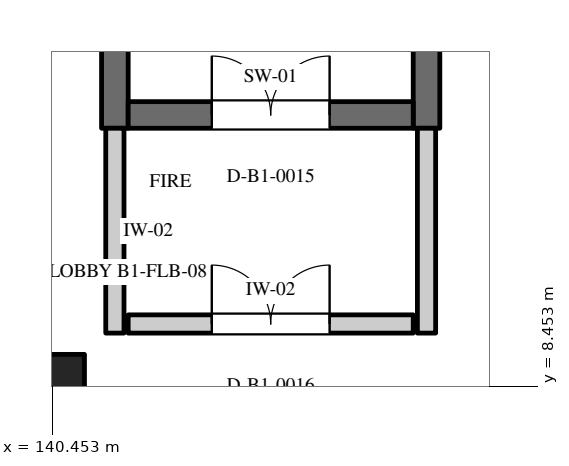
"""IFC4 building model, lengths in metres.
Left out: names, types, materials, properties, quantities, classifications, styles, units other than length and angle.
Written with IfcOpenShell. Run it as: python <this file> out.ifc"""

import sys

from ifc_helpers import new_model, si_unit, direction, frame, frame_2d, origin, origin_2d, place, context, subcontext, project, spatial, rectangle, extrude, element, fill, save


model = new_model("IFC4")
c1 = context("Model", 3, precision=1e-05, world=origin(), true_north=direction((0.0, 1.0)))
c2 = subcontext(c1, "Body", "Model", "MODEL_VIEW")
j1 = project(units=[si_unit("LENGTHUNIT", "METRE"), si_unit("PLANEANGLEUNIT", "RADIAN")], contexts=[c1])
p1 = place(None, origin())
s1 = spatial("IfcSite", under=j1, at=p1, CompositionType="ELEMENT")
p2 = place(p1, origin())
s2 = spatial("IfcBuilding", under=s1, at=p2, CompositionType="ELEMENT")
p3 = place(p2, frame((0.0, 0.0, -4.5)))
s3 = spatial("IfcBuildingStorey", under=s2, at=p3, CompositionType="ELEMENT", Elevation=-4.5)
p4 = place(p3, frame((140.4, 8.4, 0.0), z_axis=(0.0, 0.0, 1.0), x_axis=(1.0, 0.0, 0.0)))
e1 = element("IfcColumn", 1, at=p4, inside=s3, PredefinedType="COLUMN", context=c2, shape_type="SweptSolid", body=[
    extrude(rectangle(XDim=0.95, YDim=0.95, at=origin_2d()), origin(), (0.0, 0.0, 1.0), 4.5),
])
for number, where, z_axis, x_axis in (
    (2, (141.275, 11.85, 0.0), (0.0, 0.0, 1.0), (0.0, 1.0, 0.0)),
    (3, (145.375, 11.85, 0.0), (0.0, 0.0, 1.0), (0.0, 1.0, 0.0)),
):
    element("IfcWall", number, at=place(p3, frame(where, z_axis=z_axis, x_axis=x_axis)), inside=s3, PredefinedType="SHEAR", context=c2, shape_type="SweptSolid", body=[
        extrude(rectangle(XDim=10.5, YDim=0.35, at=frame_2d((5.25, 0.0))), origin(), (0.0, 0.0, 1.0), 4.5),
    ])
p5 = place(p3, frame((141.45, 12.025, 0.0), z_axis=(0.0, 0.0, 1.0), x_axis=(1.0, 0.0, 0.0)))
e4 = element("IfcWall", 4, at=p5, inside=s3, PredefinedType="SHEAR", context=c2, shape_type="SweptSolid", body=[
    extrude(rectangle(XDim=3.75, YDim=0.35, at=frame_2d((1.875, 0.0))), origin(), (0.0, 0.0, 1.0), 4.15),
])
p6 = place(p5, frame((1.1, 0.0, 0.0)))
e5 = element("IfcOpeningElement", 5, at=p6, cuts=e4, PredefinedType="OPENING", context=c2, shape_type="SweptSolid", body=[
    extrude(rectangle(XDim=1.55, YDim=2.25, at=frame_2d((0.775, 1.125))), frame((0.0, 0.187, 0.0), z_axis=(0.0, -1.0, 0.0), x_axis=(1.0, 0.0, 0.0)), (0.0, 0.0, 1.0), 0.374),
])
for number, where, z_axis, x_axis in (
    (6, (141.275, 9.155, 0.0), (0.0, 0.0, 1.0), (0.0, 1.0, 0.0)),
    (7, (145.375, 9.155, 0.0), (0.0, 0.0, 1.0), (0.0, 1.0, 0.0)),
):
    element("IfcWall", number, at=place(p3, frame(where, z_axis=z_axis, x_axis=x_axis)), inside=s3, PredefinedType="STANDARD", context=c2, shape_type="SweptSolid", body=[
        extrude(rectangle(XDim=2.695, YDim=0.24, at=frame_2d((1.348, 0.0))), origin(), (0.0, 0.0, 1.0), 4.15),
    ])
p7 = place(p3, frame((141.45, 9.275, 0.0), z_axis=(0.0, 0.0, 1.0), x_axis=(1.0, 0.0, 0.0)))
e8 = element("IfcWall", 8, at=p7, inside=s3, PredefinedType="STANDARD", context=c2, shape_type="SweptSolid", body=[
    extrude(rectangle(XDim=3.75, YDim=0.24, at=frame_2d((1.875, 0.0))), origin(), (0.0, 0.0, 1.0), 4.15),
])
p8 = place(p7, frame((1.1, 0.0, 0.0)))
e9 = element("IfcOpeningElement", 9, at=p8, cuts=e8, PredefinedType="OPENING", context=c2, shape_type="SweptSolid", body=[
    extrude(rectangle(XDim=1.55, YDim=2.25, at=frame_2d((0.775, 1.125))), frame((0.0, 0.132, 0.0), z_axis=(0.0, -1.0, 0.0), x_axis=(1.0, 0.0, 0.0)), (0.0, 0.0, 1.0), 0.264),
])
p9 = place(p6, origin())
e10 = element("IfcDoor", 10, at=p9, inside=s3, OperationType="DOUBLE_DOOR_SINGLE_SWING", PredefinedType="DOOR", context=c2, shape_type="SweptSolid", body=[
    extrude(rectangle(XDim=1.55, YDim=2.25, at=frame_2d((0.775, 1.125))), frame((0.0, 0.025, 0.0), z_axis=(0.0, -1.0, 0.0), x_axis=(1.0, 0.0, 0.0)), (0.0, 0.0, 1.0), 0.05),
])
fill(e5, e10)
p10 = place(p8, origin())
e11 = element("IfcDoor", 11, at=p10, inside=s3, OperationType="DOUBLE_DOOR_SINGLE_SWING", PredefinedType="DOOR", context=c2, shape_type="SweptSolid", body=[
    extrude(rectangle(XDim=1.55, YDim=2.25, at=frame_2d((0.775, 1.125))), frame((0.0, 0.025, 0.0), z_axis=(0.0, -1.0, 0.0), x_axis=(1.0, 0.0, 0.0)), (0.0, 0.0, 1.0), 0.05),
])
fill(e9, e11)
save(model, sys.argv[1])
